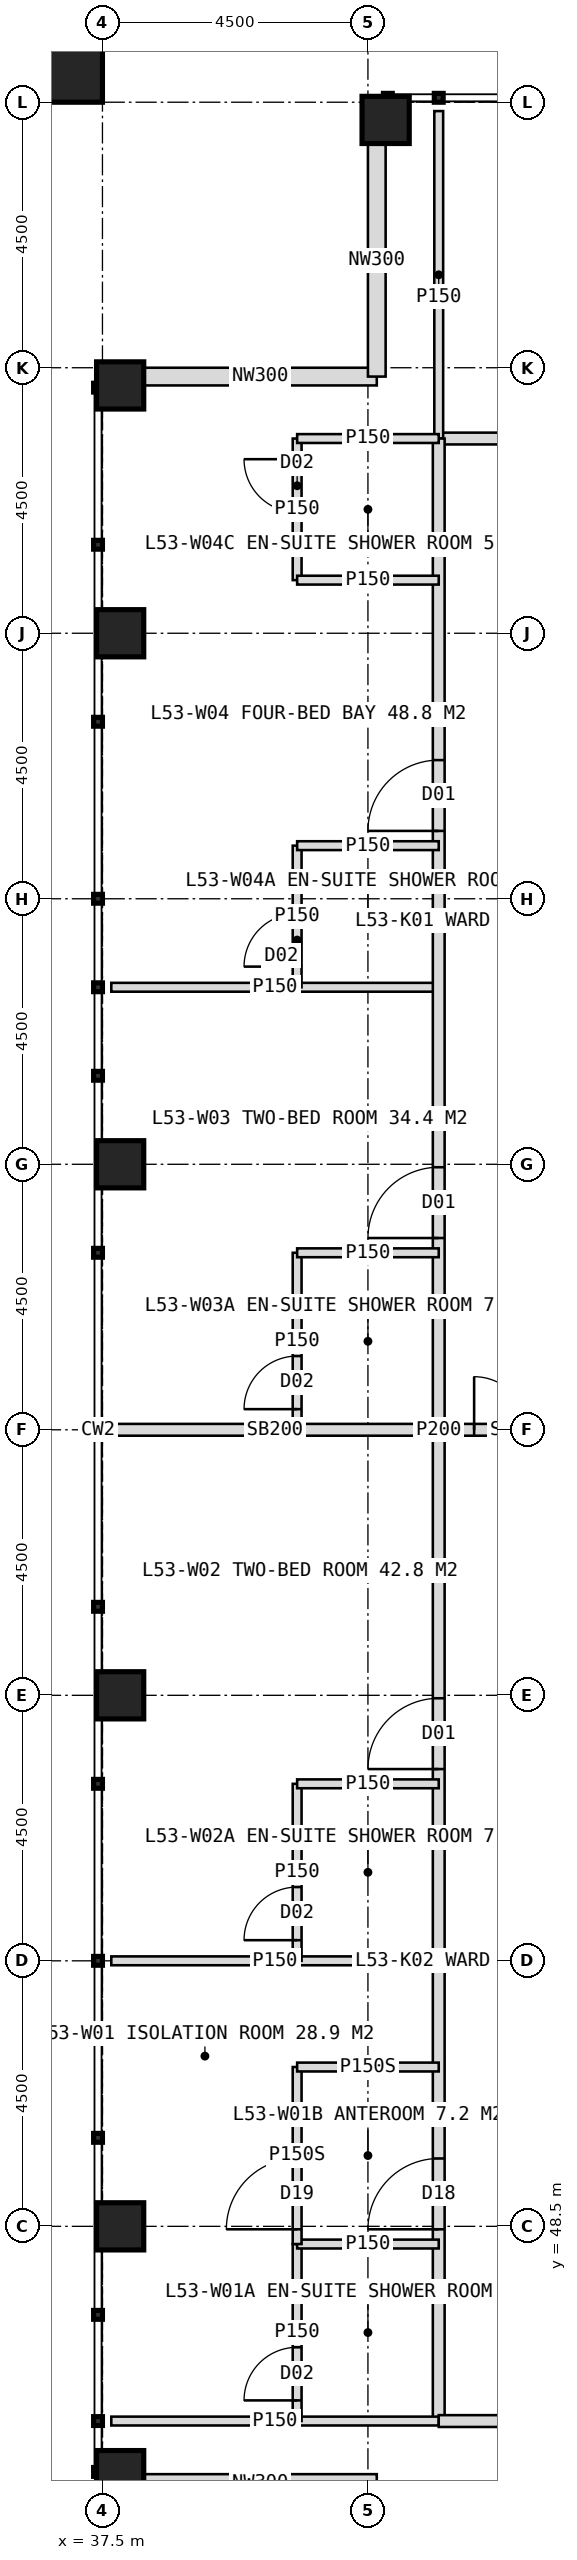
"""IFC4 building model, lengths in metres.
Left out: names, types, materials, properties, quantities, classifications, styles, units other than length and angle.
Written with IfcOpenShell. Run it as: python <this file> out.ifc"""

import sys

from ifc_helpers import new_model, si_unit, direction, frame, frame_2d, origin, origin_2d, place, context, subcontext, project, spatial, rectangle, hollow_rectangle, extrude, element, fill, save


model = new_model("IFC4")
c1 = context("Model", 3, precision=1e-05, world=origin(), true_north=direction((0.0, 1.0)))
c2 = subcontext(c1, "Body", "Model", "MODEL_VIEW")
j1 = project(units=[si_unit("LENGTHUNIT", "METRE"), si_unit("PLANEANGLEUNIT", "RADIAN")], contexts=[c1])
p1 = place(None, origin())
s1 = spatial("IfcSite", under=j1, at=p1, CompositionType="ELEMENT")
p2 = place(p1, origin())
s2 = spatial("IfcBuilding", under=s1, at=p2, CompositionType="ELEMENT")
p3 = place(p2, frame((0.0, 0.0, 221.0)))
s3 = spatial("IfcBuildingStorey", under=s2, at=p3, CompositionType="ELEMENT", Elevation=221.0)
for number, where, z_axis, x_axis in (
    (1, (42.3, 84.2, 0.0), (0.0, 0.0, 1.0), (1.0, 0.0, 0.0)),
    (2, (37.8, 44.3, 0.0), (0.0, 0.0, 1.0), (1.0, 0.0, 0.0)),
    (3, (37.8, 48.5, 0.0), (0.0, 0.0, 1.0), (1.0, 0.0, 0.0)),
    (4, (37.8, 57.5, 0.0), (0.0, 0.0, 1.0), (1.0, 0.0, 0.0)),
    (5, (37.8, 66.5, 0.0), (0.0, 0.0, 1.0), (1.0, 0.0, 0.0)),
    (6, (37.8, 75.5, 0.0), (0.0, 0.0, 1.0), (1.0, 0.0, 0.0)),
    (7, (37.8, 79.7, 0.0), (0.0, 0.0, 1.0), (1.0, 0.0, 0.0)),
):
    element("IfcColumn", number, at=place(p3, frame(where, z_axis=z_axis, x_axis=x_axis)), inside=s3, PredefinedType="COLUMN", context=c2, shape_type="SweptSolid", body=[
        extrude(hollow_rectangle(XDim=0.8, YDim=0.8, WallThickness=0.08, at=origin_2d()), origin(), (0.0, 0.0, 1.0), 4.0),
    ])
p4 = place(p3, frame((36.9, 85.1, 0.0), z_axis=(0.0, 0.0, 1.0), x_axis=(1.0, 0.0, 0.0)))
e8 = element("IfcColumn", 8, at=p4, inside=s3, PredefinedType="COLUMN", context=c2, shape_type="SweptSolid", body=[
    extrude(hollow_rectangle(XDim=1.2, YDim=1.2, WallThickness=0.07, at=origin_2d()), origin(), (0.0, 0.0, 1.0), 4.0),
])
for number, where, z_axis, x_axis in (
    (9, (38.2, 79.85, 0.0), (0.0, 0.0, 1.0), (1.0, 0.0, 0.0)),
    (10, (42.15, 79.85, 0.0), (0.0, 0.0, 1.0), (0.0, 1.0, 0.0)),
    (11, (42.15, 44.15, 0.0), (0.0, 0.0, 1.0), (-1.0, 0.0, 0.0)),
):
    element("IfcWall", number, at=place(p3, frame(where, z_axis=z_axis, x_axis=x_axis)), inside=s3, PredefinedType="ELEMENTEDWALL", context=c2, shape_type="SweptSolid", body=[
        extrude(rectangle(XDim=3.95, YDim=0.3, at=frame_2d((1.975, 0.0))), origin(), (0.0, 0.0, 1.0), 2.85),
    ])
p5 = place(p3, frame((43.2, 78.8, 0.0), z_axis=(0.0, 0.0, 1.0), x_axis=(1.0, 0.0, 0.0)))
e12 = element("IfcWall", 12, at=p5, inside=s3, PredefinedType="PARTITIONING", context=c2, shape_type="SweptSolid", body=[
    extrude(rectangle(XDim=33.6, YDim=0.2, at=frame_2d((16.8, 0.0))), origin(), (0.0, 0.0, 1.0), 3.75),
])
p6 = place(p5, frame((4.9, 0.0, 0.0)))
e13 = element("IfcOpeningElement", 13, at=p6, cuts=e12, PredefinedType="OPENING", context=c2, shape_type="SweptSolid", body=[
    extrude(rectangle(XDim=1.0, YDim=2.1, at=frame_2d((0.5, 1.05))), frame((0.0, 0.11, 0.0), z_axis=(0.0, -1.0, 0.0), x_axis=(1.0, 0.0, 0.0)), (0.0, 0.0, 1.0), 0.22),
])
p7 = place(p5, frame((14.05, 0.0, 0.0)))
e14 = element("IfcOpeningElement", 14, at=p7, cuts=e12, PredefinedType="OPENING", context=c2, shape_type="SweptSolid", body=[
    extrude(rectangle(XDim=1.2, YDim=2.2, at=frame_2d((0.6, 1.1))), frame((0.0, 0.11, 0.0), z_axis=(0.0, -1.0, 0.0), x_axis=(1.0, 0.0, 0.0)), (0.0, 0.0, 1.0), 0.22),
])
p8 = place(p5, frame((22.45, 0.0, 0.0)))
e15 = element("IfcOpeningElement", 15, at=p8, cuts=e12, PredefinedType="OPENING", context=c2, shape_type="SweptSolid", body=[
    extrude(rectangle(XDim=1.2, YDim=2.2, at=frame_2d((0.6, 1.1))), frame((0.0, 0.11, 0.0), z_axis=(0.0, -1.0, 0.0), x_axis=(1.0, 0.0, 0.0)), (0.0, 0.0, 1.0), 0.22),
])
for number, where, z_axis, x_axis in (
    (16, (43.2, 78.8, 0.0), (0.0, 0.0, 1.0), (0.0, 1.0, 0.0)),
    (17, (43.2, 53.0, 0.0), (0.0, 0.0, 1.0), (-1.0, 0.0, 0.0)),
):
    element("IfcWall", number, at=place(p3, frame(where, z_axis=z_axis, x_axis=x_axis)), inside=s3, PredefinedType="PARTITIONING", context=c2, shape_type="SweptSolid", body=[
        extrude(rectangle(XDim=5.55, YDim=0.15, at=frame_2d((2.775, 0.0))), origin(), (0.0, 0.0, 1.0), 3.75),
    ])
p9 = place(p3, frame((43.2, 62.0, 0.0), z_axis=(0.0, 0.0, 1.0), x_axis=(-1.0, 0.0, 0.0)))
e18 = element("IfcWall", 18, at=p9, inside=s3, PredefinedType="SOLIDWALL", context=c2, shape_type="SweptSolid", body=[
    extrude(rectangle(XDim=5.55, YDim=0.2, at=frame_2d((2.775, 0.0))), origin(), (0.0, 0.0, 1.0), 2.95),
])
p10 = place(p3, frame((43.2, 69.5, 0.0), z_axis=(0.0, 0.0, 1.0), x_axis=(-1.0, 0.0, 0.0)))
e19 = element("IfcWall", 19, at=p10, inside=s3, PredefinedType="PARTITIONING", context=c2, shape_type="SweptSolid", body=[
    extrude(rectangle(XDim=5.55, YDim=0.15, at=frame_2d((2.775, 0.0))), origin(), (0.0, 0.0, 1.0), 3.75),
])
p11 = place(p3, frame((43.2, 45.2, 0.0), z_axis=(0.0, 0.0, 1.0), x_axis=(0.0, 1.0, 0.0)))
e20 = element("IfcWall", 20, at=p11, inside=s3, PredefinedType="PARTITIONING", context=c2, shape_type="SweptSolid", body=[
    extrude(rectangle(XDim=33.6, YDim=0.2, at=frame_2d((16.8, 0.0))), origin(), (0.0, 0.0, 1.0), 3.75),
])
p12 = place(p11, frame((3.25, 0.0, 0.0)))
e21 = element("IfcOpeningElement", 21, at=p12, cuts=e20, PredefinedType="OPENING", context=c2, shape_type="SweptSolid", body=[
    extrude(rectangle(XDim=1.2, YDim=2.2, at=frame_2d((0.6, 1.1))), frame((0.0, 0.11, 0.0), z_axis=(0.0, -1.0, 0.0), x_axis=(1.0, 0.0, 0.0)), (0.0, 0.0, 1.0), 0.22),
])
p13 = place(p11, frame((11.05, 0.0, 0.0)))
e22 = element("IfcOpeningElement", 22, at=p13, cuts=e20, PredefinedType="OPENING", context=c2, shape_type="SweptSolid", body=[
    extrude(rectangle(XDim=1.2, YDim=2.2, at=frame_2d((0.6, 1.1))), frame((0.0, 0.11, 0.0), z_axis=(0.0, -1.0, 0.0), x_axis=(1.0, 0.0, 0.0)), (0.0, 0.0, 1.0), 0.22),
])
p14 = place(p11, frame((20.05, 0.0, 0.0)))
e23 = element("IfcOpeningElement", 23, at=p14, cuts=e20, PredefinedType="OPENING", context=c2, shape_type="SweptSolid", body=[
    extrude(rectangle(XDim=1.2, YDim=2.2, at=frame_2d((0.6, 1.1))), frame((0.0, 0.11, 0.0), z_axis=(0.0, -1.0, 0.0), x_axis=(1.0, 0.0, 0.0)), (0.0, 0.0, 1.0), 0.22),
])
p15 = place(p11, frame((26.95, 0.0, 0.0)))
e24 = element("IfcOpeningElement", 24, at=p15, cuts=e20, PredefinedType="OPENING", context=c2, shape_type="SweptSolid", body=[
    extrude(rectangle(XDim=1.2, YDim=2.2, at=frame_2d((0.6, 1.1))), frame((0.0, 0.11, 0.0), z_axis=(0.0, -1.0, 0.0), x_axis=(1.0, 0.0, 0.0)), (0.0, 0.0, 1.0), 0.22),
])
p16 = place(p3, frame((43.2, 45.2, 0.0), z_axis=(0.0, 0.0, 1.0), x_axis=(-1.0, 0.0, 0.0)))
e25 = element("IfcWall", 25, at=p16, inside=s3, PredefinedType="PARTITIONING", context=c2, shape_type="SweptSolid", body=[
    extrude(rectangle(XDim=5.55, YDim=0.15, at=frame_2d((2.775, 0.0))), origin(), (0.0, 0.0, 1.0), 3.75),
])
p17 = place(p3, frame((40.8, 45.2, 0.0), z_axis=(0.0, 0.0, 1.0), x_axis=(0.0, 1.0, 0.0)))
e26 = element("IfcWall", 26, at=p17, inside=s3, PredefinedType="PARTITIONING", context=c2, shape_type="SweptSolid", body=[
    extrude(rectangle(XDim=3.0, YDim=0.15, at=frame_2d((1.5, 0.0))), origin(), (0.0, 0.0, 1.0), 3.75),
])
p18 = place(p17, frame((0.35, 0.0, 0.0)))
e27 = element("IfcOpeningElement", 27, at=p18, cuts=e26, PredefinedType="OPENING", context=c2, shape_type="SweptSolid", body=[
    extrude(rectangle(XDim=0.9, YDim=2.1, at=frame_2d((0.45, 1.05))), frame((0.0, 0.085, 0.0), z_axis=(0.0, -1.0, 0.0), x_axis=(1.0, 0.0, 0.0)), (0.0, 0.0, 1.0), 0.17),
])
p19 = place(p3, frame((43.2, 48.2, 0.0), z_axis=(0.0, 0.0, 1.0), x_axis=(-1.0, 0.0, 0.0)))
e28 = element("IfcWall", 28, at=p19, inside=s3, PredefinedType="PARTITIONING", context=c2, shape_type="SweptSolid", body=[
    extrude(rectangle(XDim=2.4, YDim=0.15, at=frame_2d((1.2, 0.0))), origin(), (0.0, 0.0, 1.0), 3.75),
])
p20 = place(p3, frame((40.8, 48.2, 0.0), z_axis=(0.0, 0.0, 1.0), x_axis=(0.0, 1.0, 0.0)))
e29 = element("IfcWall", 29, at=p20, inside=s3, PredefinedType="PARTITIONING", context=c2, shape_type="SweptSolid", body=[
    extrude(rectangle(XDim=3.0, YDim=0.15, at=frame_2d((1.5, 0.0))), origin(), (0.0, 0.0, 1.0), 3.75),
])
p21 = place(p20, frame((0.25, 0.0, 0.0)))
e30 = element("IfcOpeningElement", 30, at=p21, cuts=e29, PredefinedType="OPENING", context=c2, shape_type="SweptSolid", body=[
    extrude(rectangle(XDim=1.2, YDim=2.2, at=frame_2d((0.6, 1.1))), frame((0.0, 0.085, 0.0), z_axis=(0.0, -1.0, 0.0), x_axis=(1.0, 0.0, 0.0)), (0.0, 0.0, 1.0), 0.17),
])
p22 = place(p3, frame((43.2, 51.2, 0.0), z_axis=(0.0, 0.0, 1.0), x_axis=(-1.0, 0.0, 0.0)))
e31 = element("IfcWall", 31, at=p22, inside=s3, PredefinedType="PARTITIONING", context=c2, shape_type="SweptSolid", body=[
    extrude(rectangle(XDim=2.4, YDim=0.15, at=frame_2d((1.2, 0.0))), origin(), (0.0, 0.0, 1.0), 3.75),
])
p23 = place(p3, frame((40.8, 53.0, 0.0), z_axis=(0.0, 0.0, 1.0), x_axis=(0.0, 1.0, 0.0)))
e32 = element("IfcWall", 32, at=p23, inside=s3, PredefinedType="PARTITIONING", context=c2, shape_type="SweptSolid", body=[
    extrude(rectangle(XDim=3.0, YDim=0.15, at=frame_2d((1.5, 0.0))), origin(), (0.0, 0.0, 1.0), 3.75),
])
p24 = place(p23, frame((0.35, 0.0, 0.0)))
e33 = element("IfcOpeningElement", 33, at=p24, cuts=e32, PredefinedType="OPENING", context=c2, shape_type="SweptSolid", body=[
    extrude(rectangle(XDim=0.9, YDim=2.1, at=frame_2d((0.45, 1.05))), frame((0.0, 0.085, 0.0), z_axis=(0.0, -1.0, 0.0), x_axis=(1.0, 0.0, 0.0)), (0.0, 0.0, 1.0), 0.17),
])
p25 = place(p3, frame((43.2, 56.0, 0.0), z_axis=(0.0, 0.0, 1.0), x_axis=(-1.0, 0.0, 0.0)))
e34 = element("IfcWall", 34, at=p25, inside=s3, PredefinedType="PARTITIONING", context=c2, shape_type="SweptSolid", body=[
    extrude(rectangle(XDim=2.4, YDim=0.15, at=frame_2d((1.2, 0.0))), origin(), (0.0, 0.0, 1.0), 3.75),
])
p26 = place(p3, frame((40.8, 62.0, 0.0), z_axis=(0.0, 0.0, 1.0), x_axis=(0.0, 1.0, 0.0)))
e35 = element("IfcWall", 35, at=p26, inside=s3, PredefinedType="PARTITIONING", context=c2, shape_type="SweptSolid", body=[
    extrude(rectangle(XDim=3.0, YDim=0.15, at=frame_2d((1.5, 0.0))), origin(), (0.0, 0.0, 1.0), 3.75),
])
p27 = place(p26, frame((0.35, 0.0, 0.0)))
e36 = element("IfcOpeningElement", 36, at=p27, cuts=e35, PredefinedType="OPENING", context=c2, shape_type="SweptSolid", body=[
    extrude(rectangle(XDim=0.9, YDim=2.1, at=frame_2d((0.45, 1.05))), frame((0.0, 0.085, 0.0), z_axis=(0.0, -1.0, 0.0), x_axis=(1.0, 0.0, 0.0)), (0.0, 0.0, 1.0), 0.17),
])
p28 = place(p3, frame((43.2, 65.0, 0.0), z_axis=(0.0, 0.0, 1.0), x_axis=(-1.0, 0.0, 0.0)))
e37 = element("IfcWall", 37, at=p28, inside=s3, PredefinedType="PARTITIONING", context=c2, shape_type="SweptSolid", body=[
    extrude(rectangle(XDim=2.4, YDim=0.15, at=frame_2d((1.2, 0.0))), origin(), (0.0, 0.0, 1.0), 3.75),
])
p29 = place(p3, frame((40.8, 69.5, 0.0), z_axis=(0.0, 0.0, 1.0), x_axis=(0.0, 1.0, 0.0)))
e38 = element("IfcWall", 38, at=p29, inside=s3, PredefinedType="PARTITIONING", context=c2, shape_type="SweptSolid", body=[
    extrude(rectangle(XDim=2.4, YDim=0.15, at=frame_2d((1.2, 0.0))), origin(), (0.0, 0.0, 1.0), 3.75),
])
p30 = place(p29, frame((0.35, 0.0, 0.0)))
e39 = element("IfcOpeningElement", 39, at=p30, cuts=e38, PredefinedType="OPENING", context=c2, shape_type="SweptSolid", body=[
    extrude(rectangle(XDim=0.9, YDim=2.1, at=frame_2d((0.45, 1.05))), frame((0.0, 0.085, 0.0), z_axis=(0.0, -1.0, 0.0), x_axis=(1.0, 0.0, 0.0)), (0.0, 0.0, 1.0), 0.17),
])
p31 = place(p3, frame((43.2, 71.9, 0.0), z_axis=(0.0, 0.0, 1.0), x_axis=(-1.0, 0.0, 0.0)))
e40 = element("IfcWall", 40, at=p31, inside=s3, PredefinedType="PARTITIONING", context=c2, shape_type="SweptSolid", body=[
    extrude(rectangle(XDim=2.4, YDim=0.15, at=frame_2d((1.2, 0.0))), origin(), (0.0, 0.0, 1.0), 3.75),
])
p32 = place(p3, frame((40.8, 76.4, 0.0), z_axis=(0.0, 0.0, 1.0), x_axis=(0.0, 1.0, 0.0)))
e41 = element("IfcWall", 41, at=p32, inside=s3, PredefinedType="PARTITIONING", context=c2, shape_type="SweptSolid", body=[
    extrude(rectangle(XDim=2.4, YDim=0.15, at=frame_2d((1.2, 0.0))), origin(), (0.0, 0.0, 1.0), 3.75),
])
p33 = place(p32, frame((1.15, 0.0, 0.0)))
e42 = element("IfcOpeningElement", 42, at=p33, cuts=e41, PredefinedType="OPENING", context=c2, shape_type="SweptSolid", body=[
    extrude(rectangle(XDim=0.9, YDim=2.1, at=frame_2d((0.45, 1.05))), frame((0.0, 0.085, 0.0), z_axis=(0.0, -1.0, 0.0), x_axis=(1.0, 0.0, 0.0)), (0.0, 0.0, 1.0), 0.17),
])
for number, where, z_axis, x_axis in (
    (43, (43.2, 76.4, 0.0), (0.0, 0.0, 1.0), (-1.0, 0.0, 0.0)),
    (44, (43.2, 78.8, 0.0), (0.0, 0.0, 1.0), (-1.0, 0.0, 0.0)),
):
    element("IfcWall", number, at=place(p3, frame(where, z_axis=z_axis, x_axis=x_axis)), inside=s3, PredefinedType="PARTITIONING", context=c2, shape_type="SweptSolid", body=[
        extrude(rectangle(XDim=2.4, YDim=0.15, at=frame_2d((1.2, 0.0))), origin(), (0.0, 0.0, 1.0), 3.75),
    ])
p34 = place(p3, frame((76.8, 45.2, 0.0), z_axis=(0.0, 0.0, 1.0), x_axis=(-1.0, 0.0, 0.0)))
e45 = element("IfcWall", 45, at=p34, inside=s3, PredefinedType="PARTITIONING", context=c2, shape_type="SweptSolid", body=[
    extrude(rectangle(XDim=33.6, YDim=0.2, at=frame_2d((16.8, 0.0))), origin(), (0.0, 0.0, 1.0), 3.75),
])
p35 = place(p34, frame((3.25, 0.0, 0.0)))
e46 = element("IfcOpeningElement", 46, at=p35, cuts=e45, PredefinedType="OPENING", context=c2, shape_type="SweptSolid", body=[
    extrude(rectangle(XDim=1.2, YDim=2.2, at=frame_2d((0.6, 1.1))), frame((0.0, 0.11, 0.0), z_axis=(0.0, -1.0, 0.0), x_axis=(1.0, 0.0, 0.0)), (0.0, 0.0, 1.0), 0.22),
])
p36 = place(p34, frame((11.05, 0.0, 0.0)))
e47 = element("IfcOpeningElement", 47, at=p36, cuts=e45, PredefinedType="OPENING", context=c2, shape_type="SweptSolid", body=[
    extrude(rectangle(XDim=1.2, YDim=2.2, at=frame_2d((0.6, 1.1))), frame((0.0, 0.11, 0.0), z_axis=(0.0, -1.0, 0.0), x_axis=(1.0, 0.0, 0.0)), (0.0, 0.0, 1.0), 0.22),
])
p37 = place(p34, frame((20.05, 0.0, 0.0)))
e48 = element("IfcOpeningElement", 48, at=p37, cuts=e45, PredefinedType="OPENING", context=c2, shape_type="SweptSolid", body=[
    extrude(rectangle(XDim=1.2, YDim=2.2, at=frame_2d((0.6, 1.1))), frame((0.0, 0.11, 0.0), z_axis=(0.0, -1.0, 0.0), x_axis=(1.0, 0.0, 0.0)), (0.0, 0.0, 1.0), 0.22),
])
p38 = place(p34, frame((29.05, 0.0, 0.0)))
e49 = element("IfcOpeningElement", 49, at=p38, cuts=e45, PredefinedType="OPENING", context=c2, shape_type="SweptSolid", body=[
    extrude(rectangle(XDim=1.2, YDim=2.2, at=frame_2d((0.6, 1.1))), frame((0.0, 0.11, 0.0), z_axis=(0.0, -1.0, 0.0), x_axis=(1.0, 0.0, 0.0)), (0.0, 0.0, 1.0), 0.22),
])
p39 = place(p3, frame((45.9, 62.0, 0.0), z_axis=(0.0, 0.0, 1.0), x_axis=(-1.0, 0.0, 0.0)))
e50 = element("IfcWall", 50, at=p39, inside=s3, PredefinedType="SOLIDWALL", context=c2, shape_type="SweptSolid", body=[
    extrude(rectangle(XDim=2.7, YDim=0.2, at=frame_2d((1.35, 0.0))), origin(), (0.0, 0.0, 1.0), 2.95),
])
p40 = place(p39, frame((0.3, 0.0, 0.0)))
e51 = element("IfcOpeningElement", 51, at=p40, cuts=e50, PredefinedType="OPENING", context=c2, shape_type="SweptSolid", body=[
    extrude(rectangle(XDim=1.8, YDim=2.2, at=frame_2d((0.9, 1.1))), frame((0.0, 0.11, 0.0), z_axis=(0.0, -1.0, 0.0), x_axis=(1.0, 0.0, 0.0)), (0.0, 0.0, 1.0), 0.22),
])
p41 = place(p21, origin())
e52 = element("IfcDoor", 52, at=p41, inside=s3, OperationType="SINGLE_SWING_LEFT", PredefinedType="DOOR", context=c2, shape_type="SweptSolid", body=[
    extrude(rectangle(XDim=1.2, YDim=2.2, at=frame_2d((0.6, 1.1))), frame((0.0, 0.025, 0.0), z_axis=(0.0, -1.0, 0.0), x_axis=(1.0, 0.0, 0.0)), (0.0, 0.0, 1.0), 0.05),
])
fill(e30, e52)
p42 = place(p12, origin())
e53 = element("IfcDoor", 53, at=p42, inside=s3, OperationType="SINGLE_SWING_LEFT", PredefinedType="DOOR", context=c2, shape_type="SweptSolid", body=[
    extrude(rectangle(XDim=1.2, YDim=2.2, at=frame_2d((0.6, 1.1))), frame((0.0, 0.025, 0.0), z_axis=(0.0, -1.0, 0.0), x_axis=(1.0, 0.0, 0.0)), (0.0, 0.0, 1.0), 0.05),
])
fill(e21, e53)
p43 = place(p18, origin())
e54 = element("IfcDoor", 54, at=p43, inside=s3, OperationType="SINGLE_SWING_LEFT", PredefinedType="DOOR", context=c2, shape_type="SweptSolid", body=[
    extrude(rectangle(XDim=0.9, YDim=2.1, at=frame_2d((0.45, 1.05))), frame((0.0, 0.025, 0.0), z_axis=(0.0, -1.0, 0.0), x_axis=(1.0, 0.0, 0.0)), (0.0, 0.0, 1.0), 0.05),
])
fill(e27, e54)
p44 = place(p13, origin())
e55 = element("IfcDoor", 55, at=p44, inside=s3, OperationType="SINGLE_SWING_LEFT", PredefinedType="DOOR", context=c2, shape_type="SweptSolid", body=[
    extrude(rectangle(XDim=1.2, YDim=2.2, at=frame_2d((0.6, 1.1))), frame((0.0, 0.025, 0.0), z_axis=(0.0, -1.0, 0.0), x_axis=(1.0, 0.0, 0.0)), (0.0, 0.0, 1.0), 0.05),
])
fill(e22, e55)
p45 = place(p24, origin())
e56 = element("IfcDoor", 56, at=p45, inside=s3, OperationType="SINGLE_SWING_LEFT", PredefinedType="DOOR", context=c2, shape_type="SweptSolid", body=[
    extrude(rectangle(XDim=0.9, YDim=2.1, at=frame_2d((0.45, 1.05))), frame((0.0, 0.025, 0.0), z_axis=(0.0, -1.0, 0.0), x_axis=(1.0, 0.0, 0.0)), (0.0, 0.0, 1.0), 0.05),
])
fill(e33, e56)
p46 = place(p14, origin())
e57 = element("IfcDoor", 57, at=p46, inside=s3, OperationType="SINGLE_SWING_LEFT", PredefinedType="DOOR", context=c2, shape_type="SweptSolid", body=[
    extrude(rectangle(XDim=1.2, YDim=2.2, at=frame_2d((0.6, 1.1))), frame((0.0, 0.025, 0.0), z_axis=(0.0, -1.0, 0.0), x_axis=(1.0, 0.0, 0.0)), (0.0, 0.0, 1.0), 0.05),
])
fill(e23, e57)
p47 = place(p27, origin())
e58 = element("IfcDoor", 58, at=p47, inside=s3, OperationType="SINGLE_SWING_LEFT", PredefinedType="DOOR", context=c2, shape_type="SweptSolid", body=[
    extrude(rectangle(XDim=0.9, YDim=2.1, at=frame_2d((0.45, 1.05))), frame((0.0, 0.025, 0.0), z_axis=(0.0, -1.0, 0.0), x_axis=(1.0, 0.0, 0.0)), (0.0, 0.0, 1.0), 0.05),
])
fill(e36, e58)
p48 = place(p15, origin())
e59 = element("IfcDoor", 59, at=p48, inside=s3, OperationType="SINGLE_SWING_LEFT", PredefinedType="DOOR", context=c2, shape_type="SweptSolid", body=[
    extrude(rectangle(XDim=1.2, YDim=2.2, at=frame_2d((0.6, 1.1))), frame((0.0, 0.025, 0.0), z_axis=(0.0, -1.0, 0.0), x_axis=(1.0, 0.0, 0.0)), (0.0, 0.0, 1.0), 0.05),
])
fill(e24, e59)
p49 = place(p30, origin())
e60 = element("IfcDoor", 60, at=p49, inside=s3, OperationType="SINGLE_SWING_LEFT", PredefinedType="DOOR", context=c2, shape_type="SweptSolid", body=[
    extrude(rectangle(XDim=0.9, YDim=2.1, at=frame_2d((0.45, 1.05))), frame((0.0, 0.025, 0.0), z_axis=(0.0, -1.0, 0.0), x_axis=(1.0, 0.0, 0.0)), (0.0, 0.0, 1.0), 0.05),
])
fill(e39, e60)
p50 = place(p33, origin())
e61 = element("IfcDoor", 61, at=p50, inside=s3, OperationType="SINGLE_SWING_RIGHT", PredefinedType="DOOR", context=c2, shape_type="SweptSolid", body=[
    extrude(rectangle(XDim=0.9, YDim=2.1, at=frame_2d((0.45, 1.05))), frame((0.0, 0.025, 0.0), z_axis=(0.0, -1.0, 0.0), x_axis=(1.0, 0.0, 0.0)), (0.0, 0.0, 1.0), 0.05),
])
fill(e42, e61)
p51 = place(p40, origin())
e62 = element("IfcDoor", 62, at=p51, inside=s3, OperationType="DOUBLE_DOOR_DOUBLE_SWING", PredefinedType="DOOR", context=c2, shape_type="SweptSolid", body=[
    extrude(rectangle(XDim=1.8, YDim=2.2, at=frame_2d((0.9, 1.1))), frame((0.0, 0.025, 0.0), z_axis=(0.0, -1.0, 0.0), x_axis=(1.0, 0.0, 0.0)), (0.0, 0.0, 1.0), 0.05),
])
fill(e51, e62)
save(model, sys.argv[1])
